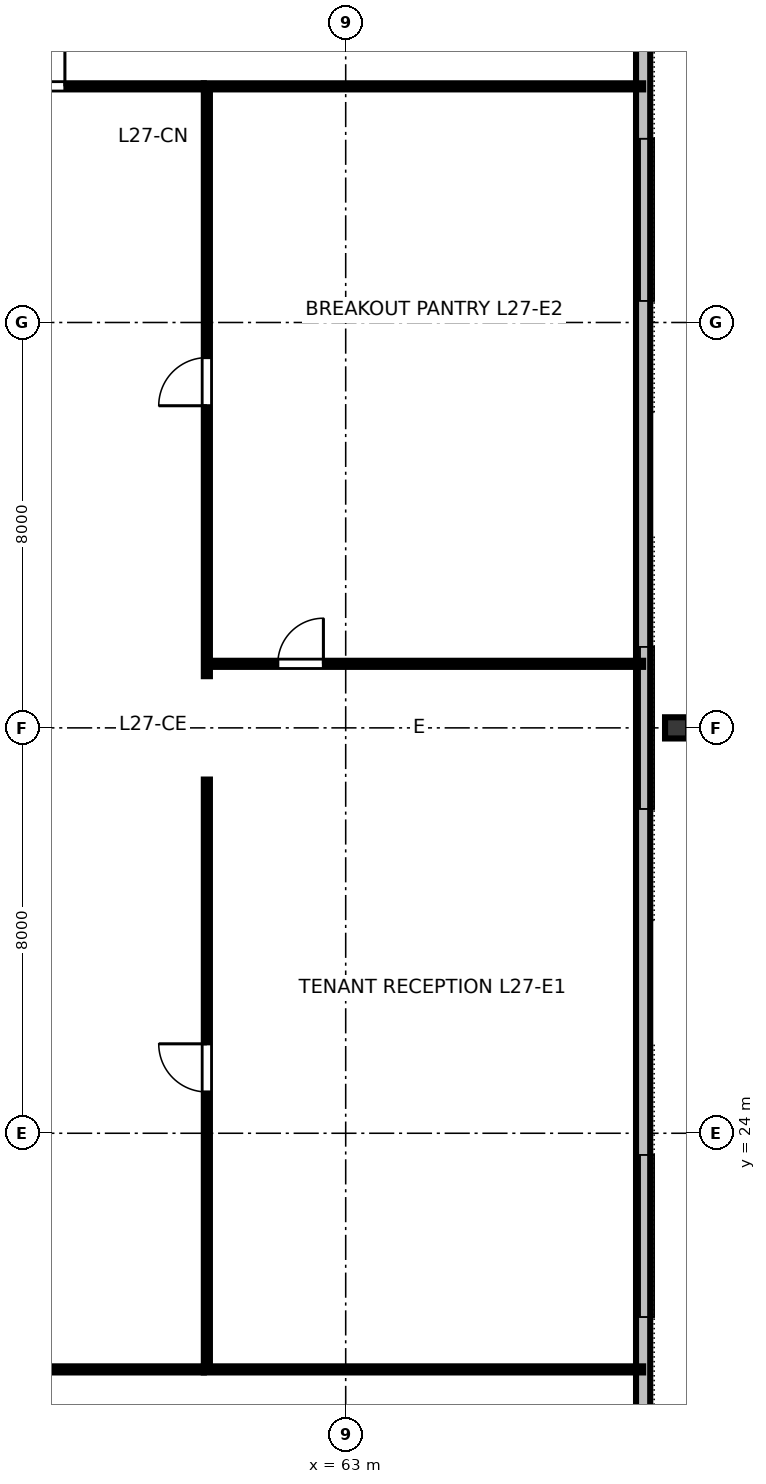
"""IFC4 building model, lengths in metres.
Left out: names, types, materials, properties, quantities, classifications, styles, units other than length and angle.
Written with IfcOpenShell. Run it as: python <this file> out.ifc"""

import sys

from ifc_helpers import new_model, si_unit, direction, frame, frame_2d, origin, origin_2d, place, context, subcontext, project, spatial, rectangle, i_section, extrude, element, fill, save


model = new_model("IFC4")
c1 = context("Model", 3, precision=1e-05, world=origin(), true_north=direction((0.0, 1.0)))
c2 = subcontext(c1, "Body", "Model", "MODEL_VIEW")
j1 = project(units=[si_unit("LENGTHUNIT", "METRE"), si_unit("PLANEANGLEUNIT", "RADIAN")], contexts=[c1])
p1 = place(None, origin())
s1 = spatial("IfcSite", under=j1, at=p1, CompositionType="ELEMENT")
p2 = place(p1, origin())
s2 = spatial("IfcBuilding", under=s1, at=p2, CompositionType="ELEMENT")
p3 = place(p2, frame((0.0, 0.0, 106.0)))
s3 = spatial("IfcBuildingStorey", under=s2, at=p3, CompositionType="ELEMENT", Elevation=106.0)
p4 = place(p3, frame((69.53, 32.0, 0.0), z_axis=(0.0, 0.0, 1.0), x_axis=(0.0, 1.0, 0.0)))
e1 = element("IfcColumn", 1, at=p4, inside=s3, PredefinedType="COLUMN", context=c2, shape_type="SweptSolid", body=[
    extrude(i_section(OverallWidth=0.418, OverallDepth=0.455, WebThickness=0.042, FlangeThickness=0.068, FilletRadius=0.025, at=origin_2d()), origin(), (0.0, 0.0, 1.0), 3.358),
])
p5 = place(p3, frame((68.87, 16.06, 0.0), z_axis=(0.0, 0.0, 1.0), x_axis=(0.0, 1.0, 0.0)))
e2 = element("IfcWall", 2, at=p5, inside=s3, PredefinedType="STANDARD", context=c2, shape_type="SweptSolid", body=[
    extrude(rectangle(XDim=31.88, YDim=0.28, at=frame_2d((15.94, 0.0))), origin(), (0.0, 0.0, 1.0), 3.36),
])
p6 = place(p3, frame((31.8, 19.34, 0.0), z_axis=(0.0, 0.0, 1.0), x_axis=(1.0, 0.0, 0.0)))
e3 = element("IfcWall", 3, at=p6, inside=s3, PredefinedType="PARTITIONING", context=c2, shape_type="SweptSolid", body=[
    extrude(rectangle(XDim=28.4, YDim=0.12, at=frame_2d((14.2, 0.0))), origin(), (0.0, 0.0, 1.0), 2.64),
])
p7 = place(p6, frame((3.152, 0.0, 0.0)))
e4 = element("IfcOpeningElement", 4, at=p7, cuts=e3, PredefinedType="OPENING", context=c2, shape_type="SweptSolid", body=[
    extrude(rectangle(XDim=0.95, YDim=2.15, at=frame_2d((0.475, 1.075))), frame((0.0, 0.07, 0.0), z_axis=(0.0, -1.0, 0.0), x_axis=(1.0, 0.0, 0.0)), (0.0, 0.0, 1.0), 0.14),
])
p8 = place(p6, frame((10.136, 0.0, 0.0)))
e5 = element("IfcOpeningElement", 5, at=p8, cuts=e3, PredefinedType="OPENING", context=c2, shape_type="SweptSolid", body=[
    extrude(rectangle(XDim=0.95, YDim=2.15, at=frame_2d((0.475, 1.075))), frame((0.0, 0.07, 0.0), z_axis=(0.0, -1.0, 0.0), x_axis=(1.0, 0.0, 0.0)), (0.0, 0.0, 1.0), 0.14),
])
p9 = place(p6, frame((15.813, 0.0, 0.0)))
e6 = element("IfcOpeningElement", 6, at=p9, cuts=e3, PredefinedType="OPENING", context=c2, shape_type="SweptSolid", body=[
    extrude(rectangle(XDim=0.95, YDim=2.15, at=frame_2d((0.475, 1.075))), frame((0.0, 0.07, 0.0), z_axis=(0.0, -1.0, 0.0), x_axis=(1.0, 0.0, 0.0)), (0.0, 0.0, 1.0), 0.14),
])
p10 = place(p6, frame((22.888, 0.0, 0.0)))
e7 = element("IfcOpeningElement", 7, at=p10, cuts=e3, PredefinedType="OPENING", context=c2, shape_type="SweptSolid", body=[
    extrude(rectangle(XDim=0.95, YDim=2.15, at=frame_2d((0.475, 1.075))), frame((0.0, 0.07, 0.0), z_axis=(0.0, -1.0, 0.0), x_axis=(1.0, 0.0, 0.0)), (0.0, 0.0, 1.0), 0.14),
])
p11 = place(p3, frame((31.8, 44.66, 0.0), z_axis=(0.0, 0.0, 1.0), x_axis=(1.0, 0.0, 0.0)))
e8 = element("IfcWall", 8, at=p11, inside=s3, PredefinedType="PARTITIONING", context=c2, shape_type="SweptSolid", body=[
    extrude(rectangle(XDim=28.4, YDim=0.12, at=frame_2d((14.2, 0.0))), origin(), (0.0, 0.0, 1.0), 2.64),
])
p12 = place(p11, frame((3.328, 0.0, 0.0)))
e9 = element("IfcOpeningElement", 9, at=p12, cuts=e8, PredefinedType="OPENING", context=c2, shape_type="SweptSolid", body=[
    extrude(rectangle(XDim=0.95, YDim=2.15, at=frame_2d((0.475, 1.075))), frame((0.0, 0.07, 0.0), z_axis=(0.0, -1.0, 0.0), x_axis=(1.0, 0.0, 0.0)), (0.0, 0.0, 1.0), 0.14),
])
p13 = place(p11, frame((8.901, 0.0, 0.0)))
e10 = element("IfcOpeningElement", 10, at=p13, cuts=e8, PredefinedType="OPENING", context=c2, shape_type="SweptSolid", body=[
    extrude(rectangle(XDim=0.95, YDim=2.15, at=frame_2d((0.475, 1.075))), frame((0.0, 0.07, 0.0), z_axis=(0.0, -1.0, 0.0), x_axis=(1.0, 0.0, 0.0)), (0.0, 0.0, 1.0), 0.14),
])
p14 = place(p11, frame((14.127, 0.0, 0.0)))
e11 = element("IfcOpeningElement", 11, at=p14, cuts=e8, PredefinedType="OPENING", context=c2, shape_type="SweptSolid", body=[
    extrude(rectangle(XDim=0.95, YDim=2.15, at=frame_2d((0.475, 1.075))), frame((0.0, 0.07, 0.0), z_axis=(0.0, -1.0, 0.0), x_axis=(1.0, 0.0, 0.0)), (0.0, 0.0, 1.0), 0.14),
])
p15 = place(p11, frame((19.537, 0.0, 0.0)))
e12 = element("IfcOpeningElement", 12, at=p15, cuts=e8, PredefinedType="OPENING", context=c2, shape_type="SweptSolid", body=[
    extrude(rectangle(XDim=0.95, YDim=2.15, at=frame_2d((0.475, 1.075))), frame((0.0, 0.07, 0.0), z_axis=(0.0, -1.0, 0.0), x_axis=(1.0, 0.0, 0.0)), (0.0, 0.0, 1.0), 0.14),
])
p16 = place(p11, frame((24.708, 0.0, 0.0)))
e13 = element("IfcOpeningElement", 13, at=p16, cuts=e8, PredefinedType="OPENING", context=c2, shape_type="SweptSolid", body=[
    extrude(rectangle(XDim=0.95, YDim=2.15, at=frame_2d((0.475, 1.075))), frame((0.0, 0.07, 0.0), z_axis=(0.0, -1.0, 0.0), x_axis=(1.0, 0.0, 0.0)), (0.0, 0.0, 1.0), 0.14),
])
p17 = place(p3, frame((60.26, 33.264, 0.0), z_axis=(0.0, 0.0, 1.0), x_axis=(1.0, 0.0, 0.0)))
e14 = element("IfcWall", 14, at=p17, inside=s3, PredefinedType="PARTITIONING", context=c2, shape_type="SweptSolid", body=[
    extrude(rectangle(XDim=8.61, YDim=0.12, at=frame_2d((4.305, 0.0))), origin(), (0.0, 0.0, 1.0), 2.64),
])
p18 = place(p17, frame((1.4, 0.0, 0.0)))
e15 = element("IfcOpeningElement", 15, at=p18, cuts=e14, PredefinedType="OPENING", context=c2, shape_type="SweptSolid", body=[
    extrude(rectangle(XDim=0.9, YDim=2.15, at=frame_2d((0.45, 1.075))), frame((0.0, 0.07, 0.0), z_axis=(0.0, -1.0, 0.0), x_axis=(1.0, 0.0, 0.0)), (0.0, 0.0, 1.0), 0.14),
])
p19 = place(p3, frame((60.26, 19.4, 0.0), z_axis=(0.0, 0.0, 1.0), x_axis=(0.0, 1.0, 0.0)))
e16 = element("IfcWall", 16, at=p19, inside=s3, PredefinedType="PARTITIONING", context=c2, shape_type="SweptSolid", body=[
    extrude(rectangle(XDim=11.58, YDim=0.12, at=frame_2d((5.79, 0.0))), origin(), (0.0, 0.0, 1.0), 2.64),
])
p20 = place(p19, frame((5.415, 0.0, 0.0)))
e17 = element("IfcOpeningElement", 17, at=p20, cuts=e16, PredefinedType="OPENING", context=c2, shape_type="SweptSolid", body=[
    extrude(rectangle(XDim=0.95, YDim=2.15, at=frame_2d((0.475, 1.075))), frame((0.0, 0.07, 0.0), z_axis=(0.0, -1.0, 0.0), x_axis=(1.0, 0.0, 0.0)), (0.0, 0.0, 1.0), 0.14),
])
p21 = place(p3, frame((60.26, 33.02, 0.0), z_axis=(0.0, 0.0, 1.0), x_axis=(0.0, 1.0, 0.0)))
e18 = element("IfcWall", 18, at=p21, inside=s3, PredefinedType="PARTITIONING", context=c2, shape_type="SweptSolid", body=[
    extrude(rectangle(XDim=11.58, YDim=0.12, at=frame_2d((5.79, 0.0))), origin(), (0.0, 0.0, 1.0), 2.64),
])
p22 = place(p21, frame((5.337, 0.0, 0.0)))
e19 = element("IfcOpeningElement", 19, at=p22, cuts=e18, PredefinedType="OPENING", context=c2, shape_type="SweptSolid", body=[
    extrude(rectangle(XDim=0.95, YDim=2.15, at=frame_2d((0.475, 1.075))), frame((0.0, 0.07, 0.0), z_axis=(0.0, -1.0, 0.0), x_axis=(1.0, 0.0, 0.0)), (0.0, 0.0, 1.0), 0.14),
])
for number, where, z_axis, x_axis in (
    (20, (60.2, 19.34, 0.0), (0.0, 0.0, 1.0), (1.0, 0.0, 0.0)),
    (21, (60.2, 44.66, 0.0), (0.0, 0.0, 1.0), (1.0, 0.0, 0.0)),
):
    element("IfcWall", number, at=place(p3, frame(where, z_axis=z_axis, x_axis=x_axis)), inside=s3, PredefinedType="PARTITIONING", context=c2, shape_type="SweptSolid", body=[
        extrude(rectangle(XDim=8.67, YDim=0.12, at=frame_2d((4.335, 0.0))), origin(), (0.0, 0.0, 1.0), 2.64),
    ])
p23 = place(p16, origin())
e22 = element("IfcDoor", 22, at=p23, inside=s3, OperationType="SINGLE_SWING_RIGHT", PredefinedType="DOOR", context=c2, shape_type="SweptSolid", body=[
    extrude(rectangle(XDim=0.95, YDim=2.15, at=frame_2d((0.475, 1.075))), frame((0.0, 0.025, 0.0), z_axis=(0.0, -1.0, 0.0), x_axis=(1.0, 0.0, 0.0)), (0.0, 0.0, 1.0), 0.05),
])
fill(e13, e22)
p24 = place(p18, origin())
e23 = element("IfcDoor", 23, at=p24, inside=s3, OperationType="SINGLE_SWING_RIGHT", PredefinedType="DOOR", context=c2, shape_type="SweptSolid", body=[
    extrude(rectangle(XDim=0.9, YDim=2.15, at=frame_2d((0.45, 1.075))), frame((0.0, 0.025, 0.0), z_axis=(0.0, -1.0, 0.0), x_axis=(1.0, 0.0, 0.0)), (0.0, 0.0, 1.0), 0.05),
])
fill(e15, e23)
p25 = place(p20, origin())
e24 = element("IfcDoor", 24, at=p25, inside=s3, OperationType="SINGLE_SWING_RIGHT", PredefinedType="DOOR", context=c2, shape_type="SweptSolid", body=[
    extrude(rectangle(XDim=0.95, YDim=2.15, at=frame_2d((0.475, 1.075))), frame((0.0, 0.025, 0.0), z_axis=(0.0, -1.0, 0.0), x_axis=(1.0, 0.0, 0.0)), (0.0, 0.0, 1.0), 0.05),
])
fill(e17, e24)
p26 = place(p22, origin())
e25 = element("IfcDoor", 25, at=p26, inside=s3, OperationType="SINGLE_SWING_LEFT", PredefinedType="DOOR", context=c2, shape_type="SweptSolid", body=[
    extrude(rectangle(XDim=0.95, YDim=2.15, at=frame_2d((0.475, 1.075))), frame((0.0, 0.025, 0.0), z_axis=(0.0, -1.0, 0.0), x_axis=(1.0, 0.0, 0.0)), (0.0, 0.0, 1.0), 0.05),
])
fill(e19, e25)
save(model, sys.argv[1])
